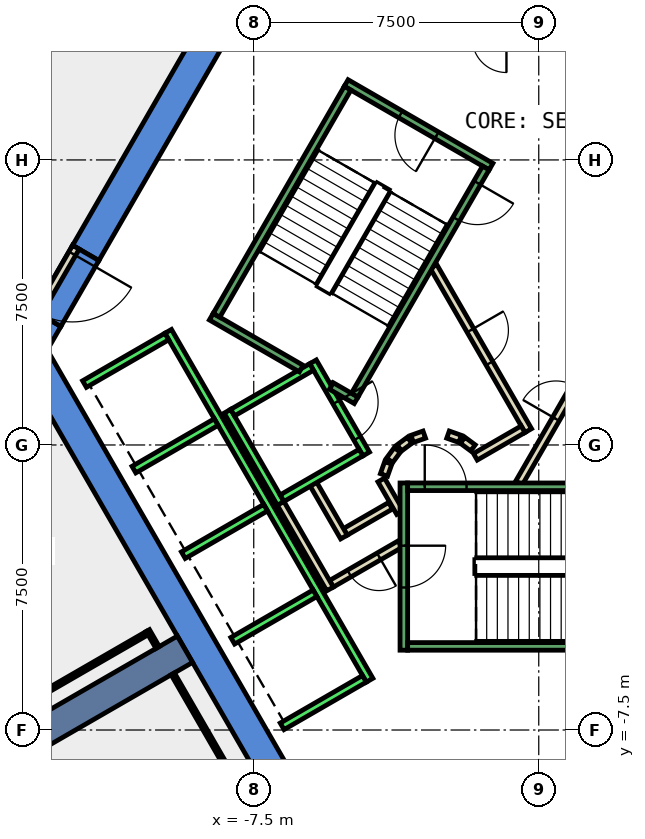
"""IFC4 building model, lengths in metres.
Left out: names, types, materials, properties, quantities, classifications, styles, units other than length and angle.
Written with IfcOpenShell. Run it as: python <this file> out.ifc"""

import sys

from ifc_helpers import new_model, si_unit, direction, frame, frame_2d, origin, place, context, subcontext, project, spatial, polyline, rectangle, outline, extrude, element, fill, save


model = new_model("IFC4")
c1 = context("Model", 3, precision=1e-05, world=origin(), true_north=direction((0.0, 1.0)))
c2 = subcontext(c1, "Body", "Model", "MODEL_VIEW")
j1 = project(units=[si_unit("LENGTHUNIT", "METRE"), si_unit("PLANEANGLEUNIT", "RADIAN")], contexts=[c1])
p1 = place(None, origin())
s1 = spatial("IfcSite", under=j1, at=p1, CompositionType="ELEMENT")
p2 = place(p1, origin())
s2 = spatial("IfcBuilding", under=s1, at=p2, CompositionType="ELEMENT")
p3 = place(p2, frame((0.0, 0.0, 146.6)))
s3 = spatial("IfcBuildingStorey", under=s2, at=p3, CompositionType="ELEMENT", Elevation=146.6)
p4 = place(p3, frame((0.0, 0.0, -0.4)))
e1 = element("IfcWall", 1, at=p4, inside=s3, PredefinedType="SHEAR", context=c2, shape_type="SweptSolid", body=[
    extrude(outline(polyline([(-12.267, 5.252), (-11.575, 4.852), (-6.466, 13.7), (-6.928, 14.5), (-12.267, 5.252)])), origin(), (0.0, 0.0, 1.0), 4.2),
])
p5 = place(p3, frame((0.0, 0.0, -0.4)))
e2 = element("IfcWall", 2, at=p5, inside=s3, PredefinedType="SHEAR", context=c2, shape_type="SweptSolid", body=[
    extrude(outline(polyline([(-12.575, 3.12), (-13.267, 3.52), (-13.856, 2.5), (-12.933, 2.5), (-12.575, 3.12)])), origin(), (0.0, 0.0, 1.0), 4.2),
])
p6 = place(p3, frame((0.0, 0.0, 3.6)))
e3 = element("IfcWall", 3, at=p6, inside=s3, PredefinedType="SHEAR", context=c2, shape_type="SweptSolid", body=[
    extrude(outline(polyline([(-13.267, 3.52), (-12.575, 3.12), (-11.575, 4.852), (-12.267, 5.252), (-13.267, 3.52)])), origin(), (0.0, 0.0, 1.0), 0.2),
])
p7 = place(p3, frame((0.0, 0.0, -0.4)))
e4 = element("IfcWall", 4, at=p7, inside=s3, PredefinedType="SHEAR", context=c2, shape_type="SweptSolid", body=[
    extrude(outline(polyline([(-13.856, 2.5), (-6.928, -9.5), (-6.466, -8.7), (-12.933, 2.5), (-13.856, 2.5)])), origin(), (0.0, 0.0, 1.0), 4.2),
])
p8 = place(p3, frame((-9.31, -5.375, -0.4), z_axis=(0.0, 0.0, 1.0), x_axis=(-0.866017533419, -0.500013631625, 0.0)))
e5 = element("IfcWall", 5, at=p8, inside=s3, PredefinedType="SHEAR", context=c2, shape_type="SweptSolid", body=[
    extrude(rectangle(XDim=9.0, YDim=0.8, at=frame_2d((4.5, 0.0))), origin(), (0.0, 0.0, 1.0), 4.2),
])
p9 = place(p3, frame((-3.9, -1.599, 0.0), z_axis=(0.0, 0.0, 1.0), x_axis=(-0.865969445389, -0.500096910261, 0.0)))
e6 = element("IfcWall", 6, at=p9, inside=s3, PredefinedType="PARTITIONING", context=c2, shape_type="SweptSolid", body=[
    extrude(rectangle(XDim=1.373, YDim=0.2, at=frame_2d((0.687, 0.0))), origin(), (0.0, 0.0, 1.0), 3.8),
])
p10 = place(p3, frame((-5.126, -2.422, 0.0), z_axis=(0.0, 0.0, 1.0), x_axis=(-0.500062241894, 0.865989465428, 0.0)))
e7 = element("IfcWall", 7, at=p10, inside=s3, PredefinedType="PARTITIONING", context=c2, shape_type="SweptSolid", body=[
    extrude(rectangle(XDim=1.7, YDim=0.2, at=frame_2d((0.85, 0.0))), origin(), (0.0, 0.0, 1.0), 3.8),
])
p11 = place(p3, frame((-3.65, -2.61, 0.0), z_axis=(0.0, 0.0, 1.0), x_axis=(-0.866072462134, -0.499918483688, 0.0)))
e8 = element("IfcWall", 8, at=p11, inside=s3, PredefinedType="PARTITIONING", context=c2, shape_type="SweptSolid", body=[
    extrude(rectangle(XDim=2.084, YDim=0.2, at=frame_2d((1.042, 0.0))), origin(), (0.0, 0.0, 1.0), 3.8),
])
p12 = place(p11, frame((0.642, 0.0, 0.0)))
e9 = element("IfcOpeningElement", 9, at=p12, cuts=e8, PredefinedType="OPENING", context=c2, shape_type="SweptSolid", body=[
    extrude(rectangle(XDim=0.9, YDim=2.1, at=frame_2d((0.45, 1.05))), frame((0.0, 0.11, 0.0), z_axis=(0.0, -1.0, 0.0), x_axis=(1.0, 0.0, 0.0)), (0.0, 0.0, 1.0), 0.22),
])
p13 = place(p3, frame((-5.492, -3.788, 0.0), z_axis=(0.0, 0.0, 1.0), x_axis=(-0.500008949224, 0.866020236886, 0.0)))
e10 = element("IfcWall", 10, at=p13, inside=s3, PredefinedType="PARTITIONING", context=c2, shape_type="SweptSolid", body=[
    extrude(rectangle(XDim=2.68, YDim=0.2, at=frame_2d((1.34, 0.0))), origin(), (0.0, 0.0, 1.0), 3.8),
])
p14 = place(p3, frame((-4.145, -0.92, 0.0), z_axis=(0.0, 0.0, 1.0), x_axis=(0.499743786207, -0.866173278362, 0.0)))
e11 = element("IfcWall", 11, at=p14, inside=s3, PredefinedType="PARTITIONING", context=c2, shape_type="SweptSolid", body=[
    extrude(rectangle(XDim=0.991, YDim=0.2, at=frame_2d((0.495, 0.0))), origin(), (0.0, 0.0, 1.0), 3.8),
])
p15 = place(p3, frame((-0.52, -1.0, 0.0), z_axis=(0.0, 0.0, 1.0), x_axis=(0.50011622646, 0.865958290007, 0.0)))
e12 = element("IfcWall", 12, at=p15, inside=s3, PredefinedType="PARTITIONING", context=c2, shape_type="SweptSolid", body=[
    extrude(rectangle(XDim=4.991, YDim=0.2, at=frame_2d((2.496, 0.0))), origin(), (0.0, 0.0, 1.0), 3.8),
])
p16 = place(p15, frame((1.945, 0.0, 0.0)))
e13 = element("IfcOpeningElement", 13, at=p16, cuts=e12, PredefinedType="OPENING", context=c2, shape_type="SweptSolid", body=[
    extrude(rectangle(XDim=1.0, YDim=2.1, at=frame_2d((0.5, 1.05))), frame((0.0, 0.11, 0.0), z_axis=(0.0, -1.0, 0.0), x_axis=(1.0, 0.0, 0.0)), (0.0, 0.0, 1.0), 0.22),
])
p17 = place(p3, frame((-2.771, 4.7, 0.0), z_axis=(0.0, 0.0, 1.0), x_axis=(0.499969479948, -0.866043023828, 0.0)))
e14 = element("IfcWall", 14, at=p17, inside=s3, PredefinedType="PARTITIONING", context=c2, shape_type="SweptSolid", body=[
    extrude(rectangle(XDim=4.99, YDim=0.2, at=frame_2d((2.495, 0.0))), origin(), (0.0, 0.0, 1.0), 3.8),
])
p18 = place(p17, frame((1.945, 0.0, 0.0)))
e15 = element("IfcOpeningElement", 15, at=p18, cuts=e14, PredefinedType="OPENING", context=c2, shape_type="SweptSolid", body=[
    extrude(rectangle(XDim=1.0, YDim=2.1, at=frame_2d((0.5, 1.05))), frame((0.0, 0.11, 0.0), z_axis=(0.0, -1.0, 0.0), x_axis=(1.0, 0.0, 0.0)), (0.0, 0.0, 1.0), 0.22),
])
p19 = place(p3, frame((-0.412, 0.414, 0.0), z_axis=(0.0, 0.0, 1.0), x_axis=(-0.866017369001, -0.500013916395, 0.0)))
e16 = element("IfcWall", 16, at=p19, inside=s3, PredefinedType="PARTITIONING", context=c2, shape_type="SweptSolid", body=[
    extrude(rectangle(XDim=1.45, YDim=0.2, at=frame_2d((0.725, 0.0))), origin(), (0.0, 0.0, 1.0), 3.8),
])
p20 = place(p3, frame((-1.731, -0.077, 0.0), z_axis=(0.0, 0.0, 1.0), x_axis=(-0.804311165252, 0.594208338422, 0.0)))
e17 = element("IfcWall", 17, at=p20, inside=s3, PredefinedType="PARTITIONING", context=c2, shape_type="SweptSolid", body=[
    extrude(rectangle(XDim=0.338, YDim=0.2, at=frame_2d((0.169, 0.0))), origin(), (0.0, 0.0, 1.0), 3.8),
])
p21 = place(p3, frame((-2.07, 0.16, 0.0), z_axis=(0.0, 0.0, 1.0), x_axis=(-0.942199461132, 0.335052496547, 0.0)))
e18 = element("IfcWall", 18, at=p21, inside=s3, PredefinedType="PARTITIONING", context=c2, shape_type="SweptSolid", body=[
    extrude(rectangle(XDim=0.337, YDim=0.2, at=frame_2d((0.169, 0.0))), origin(), (0.0, 0.0, 1.0), 3.8),
])
p22 = place(p3, frame((-3.012, 0.273, 0.0), z_axis=(0.0, 0.0, 1.0), x_axis=(-0.942280615813, -0.334824194261, 0.0)))
e19 = element("IfcWall", 19, at=p22, inside=s3, PredefinedType="PARTITIONING", context=c2, shape_type="SweptSolid", body=[
    extrude(rectangle(XDim=0.338, YDim=0.2, at=frame_2d((0.169, 0.0))), origin(), (0.0, 0.0, 1.0), 3.8),
])
p23 = place(p3, frame((-3.397, 0.124, 0.0), z_axis=(0.0, 0.0, 1.0), x_axis=(-0.804311165252, -0.594208338422, 0.0)))
e20 = element("IfcWall", 20, at=p23, inside=s3, PredefinedType="PARTITIONING", context=c2, shape_type="SweptSolid", body=[
    extrude(rectangle(XDim=0.338, YDim=0.2, at=frame_2d((0.169, 0.0))), origin(), (0.0, 0.0, 1.0), 3.8),
])
p24 = place(p3, frame((-3.723, -0.131, 0.0), z_axis=(0.0, 0.0, 1.0), x_axis=(-0.594675113454, -0.803966112121, 0.0)))
e21 = element("IfcWall", 21, at=p24, inside=s3, PredefinedType="PARTITIONING", context=c2, shape_type="SweptSolid", body=[
    extrude(rectangle(XDim=0.338, YDim=0.2, at=frame_2d((0.169, 0.0))), origin(), (0.0, 0.0, 1.0), 3.8),
])
p25 = place(p3, frame((-3.96, -0.47, 0.0), z_axis=(0.0, 0.0, 1.0), x_axis=(-0.334824194261, -0.942280615813, 0.0)))
e22 = element("IfcWall", 22, at=p25, inside=s3, PredefinedType="PARTITIONING", context=c2, shape_type="SweptSolid", body=[
    extrude(rectangle(XDim=0.338, YDim=0.2, at=frame_2d((0.169, 0.0))), origin(), (0.0, 0.0, 1.0), 3.8),
])
p26 = place(p3, frame((-7.572, -9.586, 0.0), z_axis=(0.0, 0.0, 1.0), x_axis=(-0.500037407586, 0.866003805427, 0.0)))
e23 = element("IfcWall", 23, at=p26, inside=s3, PredefinedType="PARTITIONING", context=c2, shape_type="SweptSolid", body=[
    extrude(rectangle(XDim=4.115, YDim=0.1, at=frame_2d((2.058, 0.0))), origin(), (0.0, 0.0, 1.0), 3.8),
])
p27 = place(p3, frame((-10.305, -4.951, 0.0), z_axis=(0.0, 0.0, 1.0), x_axis=(-0.866031185235, -0.4999899861, 0.0)))
e24 = element("IfcWall", 24, at=p27, inside=s3, PredefinedType="PARTITIONING", context=c2, shape_type="SweptSolid", body=[
    extrude(rectangle(XDim=4.95, YDim=0.1, at=frame_2d((2.475, 0.0))), origin(), (0.0, 0.0, 1.0), 3.8),
])
p28 = place(p3, frame((-12.18, 5.202, 0.0), z_axis=(0.0, 0.0, 1.0), x_axis=(-0.50002537861, -0.866010750942, 0.0)))
e25 = element("IfcWall", 25, at=p28, inside=s3, PredefinedType="PARTITIONING", context=c2, shape_type="SweptSolid", body=[
    extrude(rectangle(XDim=2.0, YDim=0.2, at=frame_2d((1.0, 0.0))), origin(), (0.0, 0.0, 1.0), 2.4),
])
p29 = place(p28, frame((0.19, 0.0, 0.0)))
e26 = element("IfcOpeningElement", 26, at=p29, cuts=e25, PredefinedType="OPENING", context=c2, shape_type="SweptSolid", body=[
    extrude(rectangle(XDim=1.8, YDim=2.1, at=frame_2d((0.9, 1.05))), frame((0.0, 0.11, 0.0), z_axis=(0.0, -1.0, 0.0), x_axis=(1.0, 0.0, 0.0)), (0.0, 0.0, 1.0), 0.22),
])
p30 = place(p3, frame((-10.03, -5.329, 0.0), z_axis=(0.0, 0.0, 1.0), x_axis=(-0.499352927503, 0.866398669086, 0.0)))
e27 = element("IfcWall", 27, at=p30, inside=s3, PredefinedType="PARTITIONING", context=c2, shape_type="SweptSolid", body=[
    extrude(rectangle(XDim=0.515, YDim=0.1, at=frame_2d((0.257, 0.0))), origin(), (0.0, 0.0, 1.0), 3.8),
])
p31 = place(p3, frame((-5.94, 2.188, 0.0), z_axis=(0.0, 0.0, 1.0), x_axis=(0.49994636267, -0.866056369097, 0.0)))
e28 = element("IfcWall", 28, at=p31, inside=s3, PredefinedType="STANDARD", context=c2, shape_type="SweptSolid", body=[
    extrude(rectangle(XDim=2.8, YDim=0.2, at=frame_2d((1.4, 0.0))), origin(), (0.0, 0.0, 1.0), 3.8),
])
p32 = place(p31, frame((1.225, 0.0, 0.0)))
e29 = element("IfcOpeningElement", 29, at=p32, cuts=e28, PredefinedType="OPENING", context=c2, shape_type="SweptSolid", body=[
    extrude(rectangle(XDim=1.1, YDim=2.1, at=frame_2d((0.55, 1.05))), frame((0.0, 0.11, 0.0), z_axis=(0.0, -1.0, 0.0), x_axis=(1.0, 0.0, 0.0)), (0.0, 0.0, 1.0), 0.22),
])
p33 = place(p3, frame((-8.192, 0.888, 0.0), z_axis=(0.0, 0.0, 1.0), x_axis=(0.49994636267, -0.866056369097, 0.0)))
e30 = element("IfcWall", 30, at=p33, inside=s3, PredefinedType="STANDARD", context=c2, shape_type="SweptSolid", body=[
    extrude(rectangle(XDim=2.8, YDim=0.2, at=frame_2d((1.4, 0.0))), origin(), (0.0, 0.0, 1.0), 3.8),
])
for number, where, z_axis, x_axis in (
    (31, (-5.977, 2.052, 0.0), (0.0, 0.0, 1.0), (-0.866, -0.5, 0.0)),
    (32, (-4.677, -0.2, 0.0), (0.0, 0.0, 1.0), (-0.866, -0.5, 0.0)),
):
    element("IfcWall", number, at=place(p3, frame(where, z_axis=z_axis, x_axis=x_axis)), inside=s3, PredefinedType="STANDARD", context=c2, shape_type="SweptSolid", body=[
        extrude(rectangle(XDim=2.399, YDim=0.2, at=frame_2d((1.2, 0.0))), origin(), (0.0, 0.0, 1.0), 3.8),
    ])
p34 = place(p3, frame((-9.751, 2.99, 0.0), z_axis=(0.0, 0.0, 1.0), x_axis=(0.50000090737, -0.866024879913, 0.0)))
e33 = element("IfcWall", 33, at=p34, inside=s3, PredefinedType="STANDARD", context=c2, shape_type="SweptSolid", body=[
    extrude(rectangle(XDim=10.6, YDim=0.2, at=frame_2d((5.3, 0.0))), origin(), (0.0, 0.0, 1.0), 3.8),
])
p35 = place(p3, frame((-9.788, 2.853, 0.0), z_axis=(0.0, 0.0, 1.0), x_axis=(-0.865998541277, -0.500046524342, 0.0)))
e34 = element("IfcWall", 34, at=p35, inside=s3, PredefinedType="STANDARD", context=c2, shape_type="SweptSolid", body=[
    extrude(rectangle(XDim=2.5, YDim=0.2, at=frame_2d((1.25, 0.0))), origin(), (0.0, 0.0, 1.0), 3.8),
])
for number, where, z_axis, x_axis in (
    (35, (-8.488, 0.602, 0.0), (0.0, 0.0, 1.0), (-0.866, -0.5, 0.0)),
    (36, (-7.188, -1.65, 0.0), (0.0, 0.0, 1.0), (-0.866, -0.5, 0.0)),
    (37, (-5.888, -3.902, 0.0), (0.0, 0.0, 1.0), (-0.866, -0.5, 0.0)),
    (38, (-4.588, -6.153, 0.0), (0.0, 0.0, 1.0), (-0.866, -0.5, 0.0)),
):
    element("IfcWall", number, at=place(p3, frame(where, z_axis=z_axis, x_axis=x_axis)), inside=s3, PredefinedType="STANDARD", context=c2, shape_type="SweptSolid", body=[
        extrude(rectangle(XDim=2.5, YDim=0.2, at=frame_2d((1.25, 0.0))), origin(), (0.0, 0.0, 1.0), 3.8),
    ])
p36 = place(p3, frame((-3.55, -1.0, 0.0), z_axis=(0.0, 0.0, 1.0), x_axis=(0.0, -1.0, 0.0)))
e39 = element("IfcWall", 39, at=p36, inside=s3, PredefinedType="STANDARD", context=c2, shape_type="SweptSolid", body=[
    extrude(rectangle(XDim=4.4, YDim=0.2, at=frame_2d((2.2, 0.0))), origin(), (0.0, 0.0, 1.0), 3.8),
])
p37 = place(p36, frame((1.65, 0.0, 0.0)))
e40 = element("IfcOpeningElement", 40, at=p37, cuts=e39, PredefinedType="OPENING", context=c2, shape_type="SweptSolid", body=[
    extrude(rectangle(XDim=1.1, YDim=2.2, at=frame_2d((0.55, 1.1))), frame((0.0, 0.11, 0.0), z_axis=(0.0, -1.0, 0.0), x_axis=(1.0, 0.0, 0.0)), (0.0, 0.0, 1.0), 0.22),
])
p38 = place(p3, frame((-3.45, -1.1, 0.0), z_axis=(0.0, 0.0, 1.0), x_axis=(1.0, 0.0, 0.0)))
e41 = element("IfcWall", 41, at=p38, inside=s3, PredefinedType="STANDARD", context=c2, shape_type="SweptSolid", body=[
    extrude(rectangle(XDim=6.9, YDim=0.2, at=frame_2d((3.45, 0.0))), origin(), (0.0, 0.0, 1.0), 3.8),
])
p39 = place(p38, frame((0.45, 0.0, 0.0)))
e42 = element("IfcOpeningElement", 42, at=p39, cuts=e41, PredefinedType="OPENING", context=c2, shape_type="SweptSolid", body=[
    extrude(rectangle(XDim=1.1, YDim=2.2, at=frame_2d((0.55, 1.1))), frame((0.0, 0.11, 0.0), z_axis=(0.0, -1.0, 0.0), x_axis=(1.0, 0.0, 0.0)), (0.0, 0.0, 1.0), 0.22),
])
p40 = place(p3, frame((-3.45, -5.3, 0.0), z_axis=(0.0, 0.0, 1.0), x_axis=(1.0, 0.0, 0.0)))
e43 = element("IfcWall", 43, at=p40, inside=s3, PredefinedType="STANDARD", context=c2, shape_type="SweptSolid", body=[
    extrude(rectangle(XDim=6.9, YDim=0.2, at=frame_2d((3.45, 0.0))), origin(), (0.0, 0.0, 1.0), 3.8),
])
p41 = place(p3, frame((-1.256, 7.324, 0.0), z_axis=(0.0, 0.0, 1.0), x_axis=(-0.866046073146, 0.499964197906, 0.0)))
e44 = element("IfcWall", 44, at=p41, inside=s3, PredefinedType="STANDARD", context=c2, shape_type="SweptSolid", body=[
    extrude(rectangle(XDim=4.4, YDim=0.2, at=frame_2d((2.2, 0.0))), origin(), (0.0, 0.0, 1.0), 3.8),
])
p42 = place(p41, frame((1.65, 0.0, 0.0)))
e45 = element("IfcOpeningElement", 45, at=p42, cuts=e44, PredefinedType="OPENING", context=c2, shape_type="SweptSolid", body=[
    extrude(rectangle(XDim=1.1, YDim=2.2, at=frame_2d((0.55, 1.1))), frame((0.0, 0.11, 0.0), z_axis=(0.0, -1.0, 0.0), x_axis=(1.0, 0.0, 0.0)), (0.0, 0.0, 1.0), 0.22),
])
p43 = place(p3, frame((-6.25, 2.01, 0.0), z_axis=(0.0, 0.0, 1.0), x_axis=(-0.86611865017, 0.499838457731, 0.0)))
e46 = element("IfcWall", 46, at=p43, inside=s3, PredefinedType="STANDARD", context=c2, shape_type="SweptSolid", body=[
    extrude(rectangle(XDim=2.733, YDim=0.2, at=frame_2d((1.366, 0.0))), origin(), (0.0, 0.0, 1.0), 3.8),
])
p44 = place(p3, frame((-4.806, 1.176, 0.0), z_axis=(0.0, 0.0, 1.0), x_axis=(-0.866558586415, 0.499075361355, 0.0)))
e47 = element("IfcWall", 47, at=p44, inside=s3, PredefinedType="STANDARD", context=c2, shape_type="SweptSolid", body=[
    extrude(rectangle(XDim=0.751, YDim=0.2, at=frame_2d((0.376, 0.0))), origin(), (0.0, 0.0, 1.0), 3.8),
])
p45 = place(p3, frame((-1.393, 7.288, 0.0), z_axis=(0.0, 0.0, 1.0), x_axis=(-0.499963383562, -0.866046543262, 0.0)))
e48 = element("IfcWall", 48, at=p45, inside=s3, PredefinedType="STANDARD", context=c2, shape_type="SweptSolid", body=[
    extrude(rectangle(XDim=6.9, YDim=0.2, at=frame_2d((3.45, 0.0))), origin(), (0.0, 0.0, 1.0), 3.8),
])
p46 = place(p45, frame((0.45, 0.0, 0.0)))
e49 = element("IfcOpeningElement", 49, at=p46, cuts=e48, PredefinedType="OPENING", context=c2, shape_type="SweptSolid", body=[
    extrude(rectangle(XDim=1.1, YDim=2.2, at=frame_2d((0.55, 1.1))), frame((0.0, 0.11, 0.0), z_axis=(0.0, -1.0, 0.0), x_axis=(1.0, 0.0, 0.0)), (0.0, 0.0, 1.0), 0.22),
])
p47 = place(p3, frame((-5.03, 9.388, 0.0), z_axis=(0.0, 0.0, 1.0), x_axis=(-0.499978703459, -0.866037698999, 0.0)))
e50 = element("IfcWall", 50, at=p47, inside=s3, PredefinedType="STANDARD", context=c2, shape_type="SweptSolid", body=[
    extrude(rectangle(XDim=6.9, YDim=0.2, at=frame_2d((3.45, 0.0))), origin(), (0.0, 0.0, 1.0), 3.8),
])
p48 = place(p16, origin())
e51 = element("IfcDoor", 51, at=p48, inside=s3, OperationType="SINGLE_SWING_LEFT", PredefinedType="DOOR", context=c2, shape_type="SweptSolid", body=[
    extrude(rectangle(XDim=1.0, YDim=2.1, at=frame_2d((0.5, 1.05))), frame((0.0, 0.025, 0.0), z_axis=(0.0, -1.0, 0.0), x_axis=(1.0, 0.0, 0.0)), (0.0, 0.0, 1.0), 0.05),
])
fill(e13, e51)
p49 = place(p18, origin())
e52 = element("IfcDoor", 52, at=p49, inside=s3, OperationType="SINGLE_SWING_RIGHT", PredefinedType="DOOR", context=c2, shape_type="SweptSolid", body=[
    extrude(rectangle(XDim=1.0, YDim=2.1, at=frame_2d((0.5, 1.05))), frame((0.0, 0.025, 0.0), z_axis=(0.0, -1.0, 0.0), x_axis=(1.0, 0.0, 0.0)), (0.0, 0.0, 1.0), 0.05),
])
fill(e15, e52)
p50 = place(p12, origin())
e53 = element("IfcDoor", 53, at=p50, inside=s3, OperationType="SINGLE_SWING_LEFT", PredefinedType="DOOR", context=c2, shape_type="SweptSolid", body=[
    extrude(rectangle(XDim=0.9, YDim=2.1, at=frame_2d((0.45, 1.05))), frame((0.0, 0.025, 0.0), z_axis=(0.0, -1.0, 0.0), x_axis=(1.0, 0.0, 0.0)), (0.0, 0.0, 1.0), 0.05),
])
fill(e9, e53)
p51 = place(p29, origin())
e54 = element("IfcDoor", 54, at=p51, inside=s3, OperationType="DOUBLE_DOOR_SINGLE_SWING", PredefinedType="DOOR", context=c2, shape_type="SweptSolid", body=[
    extrude(rectangle(XDim=1.8, YDim=2.1, at=frame_2d((0.9, 1.05))), frame((0.0, 0.025, 0.0), z_axis=(0.0, -1.0, 0.0), x_axis=(1.0, 0.0, 0.0)), (0.0, 0.0, 1.0), 0.05),
])
fill(e26, e54)
p52 = place(p32, origin())
e55 = element("IfcDoor", 55, at=p52, inside=s3, OperationType="SLIDING_TO_LEFT", PredefinedType="DOOR", context=c2, shape_type="SweptSolid", body=[
    extrude(rectangle(XDim=1.1, YDim=2.1, at=frame_2d((0.55, 1.05))), frame((0.0, 0.025, 0.0), z_axis=(0.0, -1.0, 0.0), x_axis=(1.0, 0.0, 0.0)), (0.0, 0.0, 1.0), 0.05),
])
fill(e29, e55)
p53 = place(p39, origin())
e56 = element("IfcDoor", 56, at=p53, inside=s3, OperationType="SINGLE_SWING_LEFT", PredefinedType="DOOR", context=c2, shape_type="SweptSolid", body=[
    extrude(rectangle(XDim=1.1, YDim=2.2, at=frame_2d((0.55, 1.1))), frame((0.0, 0.025, 0.0), z_axis=(0.0, -1.0, 0.0), x_axis=(1.0, 0.0, 0.0)), (0.0, 0.0, 1.0), 0.05),
])
fill(e42, e56)
p54 = place(p37, origin())
e57 = element("IfcDoor", 57, at=p54, inside=s3, OperationType="SINGLE_SWING_LEFT", PredefinedType="DOOR", context=c2, shape_type="SweptSolid", body=[
    extrude(rectangle(XDim=1.1, YDim=2.2, at=frame_2d((0.55, 1.1))), frame((0.0, 0.025, 0.0), z_axis=(0.0, -1.0, 0.0), x_axis=(1.0, 0.0, 0.0)), (0.0, 0.0, 1.0), 0.05),
])
fill(e40, e57)
p55 = place(p46, origin())
e58 = element("IfcDoor", 58, at=p55, inside=s3, OperationType="SINGLE_SWING_LEFT", PredefinedType="DOOR", context=c2, shape_type="SweptSolid", body=[
    extrude(rectangle(XDim=1.1, YDim=2.2, at=frame_2d((0.55, 1.1))), frame((0.0, 0.025, 0.0), z_axis=(0.0, -1.0, 0.0), x_axis=(1.0, 0.0, 0.0)), (0.0, 0.0, 1.0), 0.05),
])
fill(e49, e58)
p56 = place(p42, origin())
e59 = element("IfcDoor", 59, at=p56, inside=s3, OperationType="SINGLE_SWING_LEFT", PredefinedType="DOOR", context=c2, shape_type="SweptSolid", body=[
    extrude(rectangle(XDim=1.1, YDim=2.2, at=frame_2d((0.55, 1.1))), frame((0.0, 0.025, 0.0), z_axis=(0.0, -1.0, 0.0), x_axis=(1.0, 0.0, 0.0)), (0.0, 0.0, 1.0), 0.05),
])
fill(e45, e59)
save(model, sys.argv[1])
